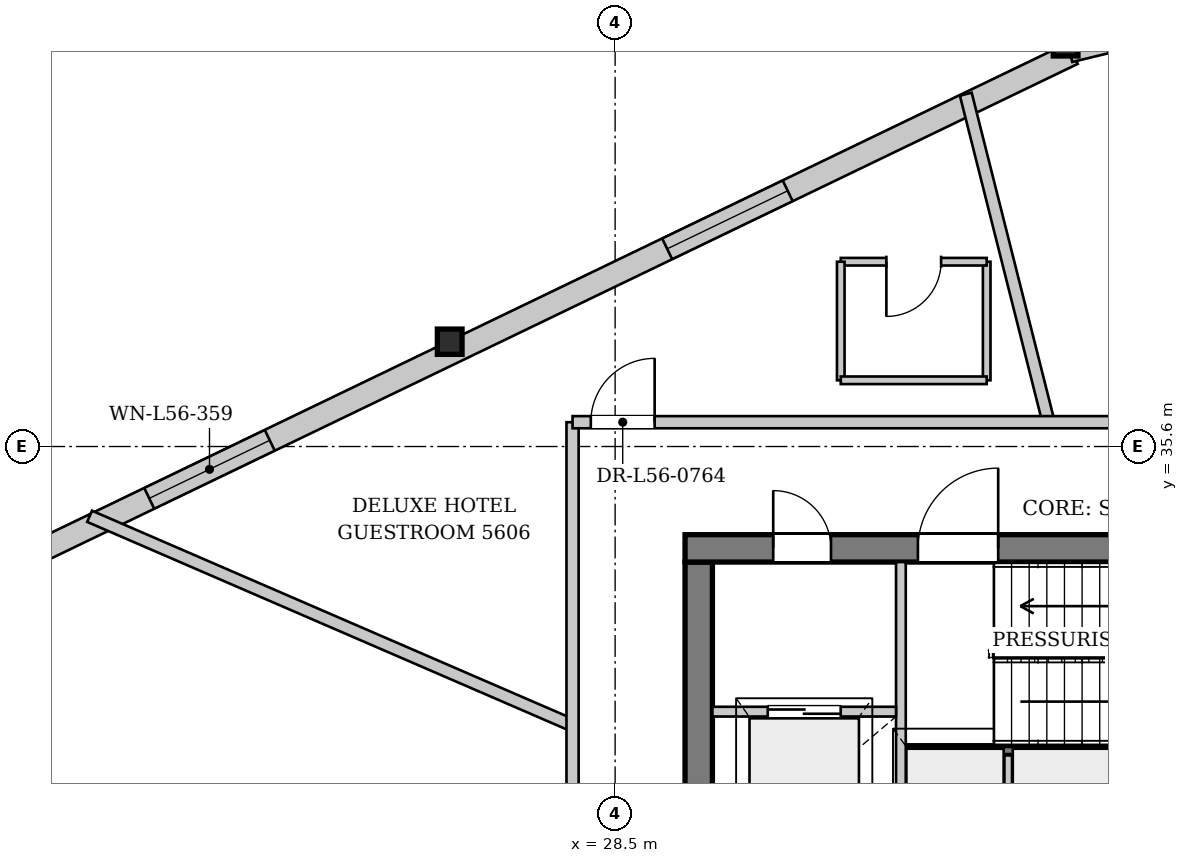
"""IFC4 building model, lengths in metres.
Left out: names, types, materials, properties, quantities, classifications, styles, units other than length and angle.
Written with IfcOpenShell. Run it as: python <this file> out.ifc"""

import sys

from ifc_helpers import new_model, si_unit, direction, frame, frame_2d, origin, origin_2d, place, context, subcontext, project, spatial, rectangle, i_section, extrude, source, transform, mapped, element, fill, save


model = new_model("IFC4")
c1 = context("Model", 3, precision=1e-05, world=origin(), true_north=direction((0.0, 1.0)))
c2 = subcontext(c1, "Body", "Model", "MODEL_VIEW")
j1 = project(units=[si_unit("LENGTHUNIT", "METRE"), si_unit("PLANEANGLEUNIT", "RADIAN")], contexts=[c1])
p1 = place(None, origin())
s1 = spatial("IfcSite", under=j1, at=p1, CompositionType="ELEMENT")
p2 = place(p1, origin())
s2 = spatial("IfcBuilding", under=s1, at=p2, CompositionType="ELEMENT")
p3 = place(p2, frame((0.0, 0.0, 213.15)))
s3 = spatial("IfcBuildingStorey", under=s2, at=p3, CompositionType="ELEMENT", Elevation=213.15)
m1 = source(origin(), c2, "Body", "SweptSolid", [
    extrude(i_section(OverallWidth=0.406, OverallDepth=0.416, WebThickness=0.027, FlangeThickness=0.042, at=origin_2d()), origin(), (0.0, 0.0, 1.0), 3.386),
])
for number, where, z_axis, x_axis in (
    (1, (35.943, 42.235, 0.0), (-0.02, -0.003, 1.0), (0.135, -0.991, 0.0)),
    (2, (25.803, 37.35, 0.0), (-0.014, -0.016, 1.0), (0.75, -0.661, 0.0)),
):
    element("IfcColumn", number, at=place(p3, frame(where, z_axis=z_axis, x_axis=x_axis)), inside=s3, PredefinedType="COLUMN", context=c2, shape_type="MappedRepresentation", body=[
        mapped(m1, transform((0.0, 0.0, 0.0), x_axis=(1.0, 0.0, 0.0), y_axis=(0.0, 1.0, 0.0), z_axis=(0.0, 0.0, 1.0), scale=1.0)),
    ])
p4 = place(p3, frame((15.745, 32.294, 0.0), z_axis=(0.0, 0.0, 1.0), x_axis=(0.900909174289, 0.434007672377, 0.0)))
e3 = element("IfcWall", 3, at=p4, inside=s3, PredefinedType="SOLIDWALL", context=c2, shape_type="SweptSolid", body=[
    extrude(rectangle(XDim=22.511, YDim=0.38, at=frame_2d((11.256, 0.0))), origin(), (0.0, 0.0, 1.0), 2.822),
])
p5 = place(p4, frame((5.653, 0.0, 0.452)))
e4 = element("IfcOpeningElement", 4, at=p5, cuts=e3, PredefinedType="OPENING", context=c2, shape_type="SweptSolid", body=[
    extrude(rectangle(XDim=2.2, YDim=2.25, at=frame_2d((1.1, 1.125))), frame((0.0, 0.2, 0.0), z_axis=(0.0, -1.0, 0.0), x_axis=(1.0, 0.0, 0.0)), (0.0, 0.0, 1.0), 0.4),
])
p6 = place(p4, frame((15.108, 0.0, 0.452)))
e5 = element("IfcOpeningElement", 5, at=p6, cuts=e3, PredefinedType="OPENING", context=c2, shape_type="SweptSolid", body=[
    extrude(rectangle(XDim=2.2, YDim=2.25, at=frame_2d((1.1, 1.125))), frame((0.0, 0.2, 0.0), z_axis=(0.0, -1.0, 0.0), x_axis=(1.0, 0.0, 0.0)), (0.0, 0.0, 1.0), 0.4),
])
p7 = place(p3, frame((35.981, 42.079, 0.0), z_axis=(0.0, 0.0, 1.0), x_axis=(0.97201999071, 0.234898143159, 0.0)))
e6 = element("IfcWall", 6, at=p7, inside=s3, PredefinedType="SOLIDWALL", context=c2, shape_type="SweptSolid", body=[
    extrude(rectangle(XDim=22.511, YDim=0.32, at=frame_2d((11.256, 0.0))), origin(), (0.0, 0.0, 1.0), 2.822),
])
p8 = place(p7, frame((6.454, 0.0, 0.0)))
e7 = element("IfcOpeningElement", 7, at=p8, cuts=e6, PredefinedType="OPENING", context=c2, shape_type="SweptSolid", body=[
    extrude(rectangle(XDim=1.5, YDim=2.3, at=frame_2d((0.75, 1.15))), frame((0.0, 0.17, 0.0), z_axis=(0.0, -1.0, 0.0), x_axis=(1.0, 0.0, 0.0)), (0.0, 0.0, 1.0), 0.34),
])
p9 = place(p7, frame((15.358, 0.0, 0.352)))
e8 = element("IfcOpeningElement", 8, at=p9, cuts=e6, PredefinedType="OPENING", context=c2, shape_type="SweptSolid", body=[
    extrude(rectangle(XDim=2.6, YDim=2.35, at=frame_2d((1.3, 1.175))), frame((0.0, 0.17, 0.0), z_axis=(0.0, -1.0, 0.0), x_axis=(1.0, 0.0, 0.0)), (0.0, 0.0, 1.0), 0.34),
])
p10 = place(p3, frame((29.875, 19.5, 0.0), z_axis=(0.0, 0.0, 1.0), x_axis=(0.0, 1.0, 0.0)))
e9 = element("IfcWall", 9, at=p10, inside=s3, PredefinedType="SHEAR", context=c2, shape_type="SweptSolid", body=[
    extrude(rectangle(XDim=14.2, YDim=0.45, at=frame_2d((7.1, 0.0))), origin(), (0.0, 0.0, 1.0), 3.33),
])
p11 = place(p10, frame((7.42, 0.0, 0.0)))
e10 = element("IfcOpeningElement", 10, at=p11, cuts=e9, PredefinedType="OPENING", context=c2, shape_type="SweptSolid", body=[
    extrude(rectangle(XDim=1.6, YDim=2.2, at=frame_2d((0.8, 1.1))), frame((0.0, 0.235, 0.0), z_axis=(0.0, -1.0, 0.0), x_axis=(1.0, 0.0, 0.0)), (0.0, 0.0, 1.0), 0.47),
])
p12 = place(p3, frame((29.65, 33.925, 0.0), z_axis=(0.0, 0.0, 1.0), x_axis=(1.0, 0.0, 0.0)))
e11 = element("IfcWall", 11, at=p12, inside=s3, PredefinedType="SHEAR", context=c2, shape_type="SweptSolid", body=[
    extrude(rectangle(XDim=16.7, YDim=0.45, at=frame_2d((8.35, 0.0))), origin(), (0.0, 0.0, 1.0), 3.33),
])
p13 = place(p12, frame((1.45, 0.0, 0.0)))
e12 = element("IfcOpeningElement", 12, at=p13, cuts=e11, PredefinedType="OPENING", context=c2, shape_type="SweptSolid", body=[
    extrude(rectangle(XDim=0.95, YDim=2.1, at=frame_2d((0.475, 1.05))), frame((0.0, 0.235, 0.0), z_axis=(0.0, -1.0, 0.0), x_axis=(1.0, 0.0, 0.0)), (0.0, 0.0, 1.0), 0.47),
])
p14 = place(p12, frame((3.83, 0.0, 0.0)))
e13 = element("IfcOpeningElement", 13, at=p14, cuts=e11, PredefinedType="OPENING", context=c2, shape_type="SweptSolid", body=[
    extrude(rectangle(XDim=1.32, YDim=2.2, at=frame_2d((0.66, 1.1))), frame((0.0, 0.235, 0.0), z_axis=(0.0, -1.0, 0.0), x_axis=(1.0, 0.0, 0.0)), (0.0, 0.0, 1.0), 0.47),
])
p15 = place(p3, frame((33.28, 30.6, 0.0), z_axis=(0.0, 0.0, 1.0), x_axis=(1.0, 0.0, 0.0)))
e14 = element("IfcWall", 14, at=p15, inside=s3, PredefinedType="PARTITIONING", context=c2, shape_type="SweptSolid", body=[
    extrude(rectangle(XDim=7.3, YDim=0.16, at=frame_2d((3.65, 0.0))), origin(), (0.0, 0.0, 1.0), 3.33),
])
p16 = place(p3, frame((33.2, 28.44, 0.0), z_axis=(0.0, 0.0, 1.0), x_axis=(0.0, 1.0, 0.0)))
e15 = element("IfcWall", 15, at=p16, inside=s3, PredefinedType="PARTITIONING", context=c2, shape_type="SweptSolid", body=[
    extrude(rectangle(XDim=5.26, YDim=0.16, at=frame_2d((2.63, 0.0))), origin(), (0.0, 0.0, 1.0), 3.33),
])
p17 = place(p3, frame((30.1, 31.24, 0.0), z_axis=(0.0, 0.0, 1.0), x_axis=(1.0, 0.0, 0.0)))
e16 = element("IfcWall", 16, at=p17, inside=s3, PredefinedType="PARTITIONING", context=c2, shape_type="SweptSolid", body=[
    extrude(rectangle(XDim=3.02, YDim=0.16, at=frame_2d((1.51, 0.0))), origin(), (0.0, 0.0, 1.0), 3.33),
])
p18 = place(p17, frame((0.91, 0.0, 0.0)))
e17 = element("IfcOpeningElement", 17, at=p18, cuts=e16, PredefinedType="OPENING", context=c2, shape_type="SweptSolid", body=[
    extrude(rectangle(XDim=1.2, YDim=2.2, at=frame_2d((0.6, 1.1))), frame((0.0, 0.09, 0.0), z_axis=(0.0, -1.0, 0.0), x_axis=(1.0, 0.0, 0.0)), (0.0, 0.0, 1.0), 0.18),
])
p19 = place(p3, frame((34.965, 28.6, 0.0), z_axis=(0.0, 0.0, 1.0), x_axis=(0.0, 1.0, 0.0)))
e18 = element("IfcWall", 18, at=p19, inside=s3, PredefinedType="PARTITIONING", context=c2, shape_type="SweptSolid", body=[
    extrude(rectangle(XDim=1.92, YDim=0.125, at=frame_2d((0.96, 0.0))), origin(), (0.0, 0.0, 1.0), 3.33),
])
p20 = place(p3, frame((35.628, 36.0, 0.0), z_axis=(0.0, 0.0, 1.0), x_axis=(-0.244651792325, 0.96961100474, 0.0)))
e19 = element("IfcWall", 19, at=p20, inside=s3, PredefinedType="PARTITIONING", context=c2, shape_type="SweptSolid", body=[
    extrude(rectangle(XDim=5.563, YDim=0.2, at=frame_2d((2.782, 0.0))), origin(), (0.0, 0.0, 1.0), 3.33),
])
p21 = place(p3, frame((27.8, 31.014, 0.0), z_axis=(0.0, 0.0, 1.0), x_axis=(-0.917740071977, 0.397181520577, 0.0)))
e20 = element("IfcWall", 20, at=p21, inside=s3, PredefinedType="PARTITIONING", context=c2, shape_type="SweptSolid", body=[
    extrude(rectangle(XDim=8.655, YDim=0.2, at=frame_2d((4.328, 0.0))), origin(), (0.0, 0.0, 1.0), 3.33),
])
p22 = place(p3, frame((34.611, 36.689, 0.0), z_axis=(0.0, 0.0, 1.0), x_axis=(0.0, 1.0, 0.0)))
e21 = element("IfcWall", 21, at=p22, inside=s3, PredefinedType="PARTITIONING", context=c2, shape_type="SweptSolid", body=[
    extrude(rectangle(XDim=1.95, YDim=0.125, at=frame_2d((0.975, 0.0))), origin(), (0.0, 0.0, 1.0), 3.33),
])
p23 = place(p3, frame((34.611, 38.639, 0.0), z_axis=(0.0, 0.0, 1.0), x_axis=(-1.0, 0.0, 0.0)))
e22 = element("IfcWall", 22, at=p23, inside=s3, PredefinedType="PARTITIONING", context=c2, shape_type="SweptSolid", body=[
    extrude(rectangle(XDim=2.4, YDim=0.125, at=frame_2d((1.2, 0.0))), origin(), (0.0, 0.0, 1.0), 3.33),
])
p24 = place(p23, frame((0.75, 0.0, 0.0)))
e23 = element("IfcOpeningElement", 23, at=p24, cuts=e22, PredefinedType="OPENING", context=c2, shape_type="SweptSolid", body=[
    extrude(rectangle(XDim=0.9, YDim=2.1, at=frame_2d((0.45, 1.05))), frame((0.0, 0.073, 0.0), z_axis=(0.0, -1.0, 0.0), x_axis=(1.0, 0.0, 0.0)), (0.0, 0.0, 1.0), 0.145),
])
p25 = place(p3, frame((32.211, 38.639, 0.0), z_axis=(0.0, 0.0, 1.0), x_axis=(0.0, -1.0, 0.0)))
e24 = element("IfcWall", 24, at=p25, inside=s3, PredefinedType="PARTITIONING", context=c2, shape_type="SweptSolid", body=[
    extrude(rectangle(XDim=1.95, YDim=0.125, at=frame_2d((0.975, 0.0))), origin(), (0.0, 0.0, 1.0), 3.33),
])
p26 = place(p3, frame((32.211, 36.689, 0.0), z_axis=(0.0, 0.0, 1.0), x_axis=(1.0, 0.0, 0.0)))
e25 = element("IfcWall", 25, at=p26, inside=s3, PredefinedType="PARTITIONING", context=c2, shape_type="SweptSolid", body=[
    extrude(rectangle(XDim=2.4, YDim=0.125, at=frame_2d((1.2, 0.0))), origin(), (0.0, 0.0, 1.0), 3.33),
])
p27 = place(p3, frame((27.8, 17.2, 0.0), z_axis=(0.0, 0.0, 1.0), x_axis=(0.0, 1.0, 0.0)))
e26 = element("IfcWall", 26, at=p27, inside=s3, PredefinedType="PARTITIONING", context=c2, shape_type="SweptSolid", body=[
    extrude(rectangle(XDim=18.8, YDim=0.2, at=frame_2d((9.4, 0.0))), origin(), (0.0, 0.0, 1.0), 3.33),
])
p28 = place(p27, frame((9.453, 0.0, 0.0)))
e27 = element("IfcOpeningElement", 27, at=p28, cuts=e26, PredefinedType="OPENING", context=c2, shape_type="SweptSolid", body=[
    extrude(rectangle(XDim=1.05, YDim=2.2, at=frame_2d((0.525, 1.1))), frame((0.0, 0.11, 0.0), z_axis=(0.0, -1.0, 0.0), x_axis=(1.0, 0.0, 0.0)), (0.0, 0.0, 1.0), 0.22),
])
p29 = place(p3, frame((27.8, 36.0, 0.0), z_axis=(0.0, 0.0, 1.0), x_axis=(1.0, 0.0, 0.0)))
e28 = element("IfcWall", 28, at=p29, inside=s3, PredefinedType="PARTITIONING", context=c2, shape_type="SweptSolid", body=[
    extrude(rectangle(XDim=13.2, YDim=0.2, at=frame_2d((6.6, 0.0))), origin(), (0.0, 0.0, 1.0), 3.33),
])
p30 = place(p29, frame((11.85, 0.0, 0.0)))
e29 = element("IfcOpeningElement", 29, at=p30, cuts=e28, PredefinedType="OPENING", context=c2, shape_type="SweptSolid", body=[
    extrude(rectangle(XDim=1.05, YDim=2.2, at=frame_2d((0.525, 1.1))), frame((0.0, 0.11, 0.0), z_axis=(0.0, -1.0, 0.0), x_axis=(1.0, 0.0, 0.0)), (0.0, 0.0, 1.0), 0.22),
])
p31 = place(p29, frame((0.3, 0.0, 0.0)))
e30 = element("IfcOpeningElement", 30, at=p31, cuts=e28, PredefinedType="OPENING", context=c2, shape_type="SweptSolid", body=[
    extrude(rectangle(XDim=1.05, YDim=2.2, at=frame_2d((0.525, 1.1))), frame((0.0, 0.11, 0.0), z_axis=(0.0, -1.0, 0.0), x_axis=(1.0, 0.0, 0.0)), (0.0, 0.0, 1.0), 0.22),
])
m2 = source(origin(), c2, "Body", "SweptSolid", [
    extrude(rectangle(XDim=2.2, YDim=2.25, at=frame_2d((1.1, 1.125))), frame((0.0, 0.03, 0.0), z_axis=(0.0, -1.0, 0.0), x_axis=(1.0, 0.0, 0.0)), (0.0, 0.0, 1.0), 0.06),
])
p32 = place(p5, origin())
e31 = element("IfcWindow", 31, at=p32, inside=s3, PartitioningType="SINGLE_PANEL", PredefinedType="WINDOW", context=c2, shape_type="MappedRepresentation", body=[
    mapped(m2, transform((0.0, 0.0, 0.0), x_axis=(1.0, 0.0, 0.0), y_axis=(0.0, 1.0, 0.0), z_axis=(0.0, 0.0, 1.0), scale=1.0)),
])
fill(e4, e31)
p33 = place(p6, origin())
e32 = element("IfcWindow", 32, at=p33, inside=s3, PartitioningType="SINGLE_PANEL", PredefinedType="WINDOW", context=c2, shape_type="MappedRepresentation", body=[
    mapped(m2, transform((0.0, 0.0, 0.0), x_axis=(1.0, 0.0, 0.0), y_axis=(0.0, 1.0, 0.0), z_axis=(0.0, 0.0, 1.0), scale=1.0)),
])
fill(e5, e32)
m3 = source(origin(), c2, "Body", "SweptSolid", [
    extrude(rectangle(XDim=0.95, YDim=2.1, at=frame_2d((0.475, 1.05))), frame((0.0, 0.025, 0.0), z_axis=(0.0, -1.0, 0.0), x_axis=(1.0, 0.0, 0.0)), (0.0, 0.0, 1.0), 0.05),
])
p34 = place(p13, origin())
e33 = element("IfcDoor", 33, at=p34, inside=s3, OperationType="SINGLE_SWING_LEFT", PredefinedType="DOOR", context=c2, shape_type="MappedRepresentation", body=[
    mapped(m3, transform((0.0, 0.0, 0.0), x_axis=(1.0, 0.0, 0.0), y_axis=(0.0, 1.0, 0.0), z_axis=(0.0, 0.0, 1.0), scale=1.0)),
])
fill(e12, e33)
m4 = source(origin(), c2, "Body", "SweptSolid", [
    extrude(rectangle(XDim=1.32, YDim=2.2, at=frame_2d((0.66, 1.1))), frame((0.0, 0.025, 0.0), z_axis=(0.0, -1.0, 0.0), x_axis=(1.0, 0.0, 0.0)), (0.0, 0.0, 1.0), 0.05),
])
p35 = place(p14, origin())
e34 = element("IfcDoor", 34, at=p35, inside=s3, OperationType="SINGLE_SWING_RIGHT", PredefinedType="DOOR", context=c2, shape_type="MappedRepresentation", body=[
    mapped(m4, transform((0.0, 0.0, 0.0), x_axis=(1.0, 0.0, 0.0), y_axis=(0.0, 1.0, 0.0), z_axis=(0.0, 0.0, 1.0), scale=1.0)),
])
fill(e13, e34)
m5 = source(origin(), c2, "Body", "SweptSolid", [
    extrude(rectangle(XDim=1.2, YDim=2.2, at=frame_2d((0.6, 1.1))), frame((0.0, 0.025, 0.0), z_axis=(0.0, -1.0, 0.0), x_axis=(1.0, 0.0, 0.0)), (0.0, 0.0, 1.0), 0.05),
])
p36 = place(p18, origin())
e35 = element("IfcDoor", 35, at=p36, inside=s3, OperationType="DOUBLE_DOOR_SLIDING", PredefinedType="DOOR", context=c2, shape_type="MappedRepresentation", body=[
    mapped(m5, transform((0.0, 0.0, 0.0), x_axis=(1.0, 0.0, 0.0), y_axis=(0.0, 1.0, 0.0), z_axis=(0.0, 0.0, 1.0), scale=1.0)),
])
fill(e17, e35)
m6 = source(origin(), c2, "Body", "SweptSolid", [
    extrude(rectangle(XDim=0.9, YDim=2.1, at=frame_2d((0.45, 1.05))), frame((0.0, 0.025, 0.0), z_axis=(0.0, -1.0, 0.0), x_axis=(1.0, 0.0, 0.0)), (0.0, 0.0, 1.0), 0.05),
])
p37 = place(p24, origin())
e36 = element("IfcDoor", 36, at=p37, inside=s3, OperationType="SINGLE_SWING_RIGHT", PredefinedType="DOOR", context=c2, shape_type="MappedRepresentation", body=[
    mapped(m6, transform((0.0, 0.0, 0.0), x_axis=(1.0, 0.0, 0.0), y_axis=(0.0, 1.0, 0.0), z_axis=(0.0, 0.0, 1.0), scale=1.0)),
])
fill(e23, e36)
m7 = source(origin(), c2, "Body", "SweptSolid", [
    extrude(rectangle(XDim=1.05, YDim=2.2, at=frame_2d((0.525, 1.1))), frame((0.0, 0.025, 0.0), z_axis=(0.0, -1.0, 0.0), x_axis=(1.0, 0.0, 0.0)), (0.0, 0.0, 1.0), 0.05),
])
p38 = place(p31, origin())
e37 = element("IfcDoor", 37, at=p38, inside=s3, OperationType="SINGLE_SWING_RIGHT", PredefinedType="DOOR", context=c2, shape_type="MappedRepresentation", body=[
    mapped(m7, transform((0.0, 0.0, 0.0), x_axis=(1.0, 0.0, 0.0), y_axis=(0.0, 1.0, 0.0), z_axis=(0.0, 0.0, 1.0), scale=1.0)),
])
fill(e30, e37)
save(model, sys.argv[1])
